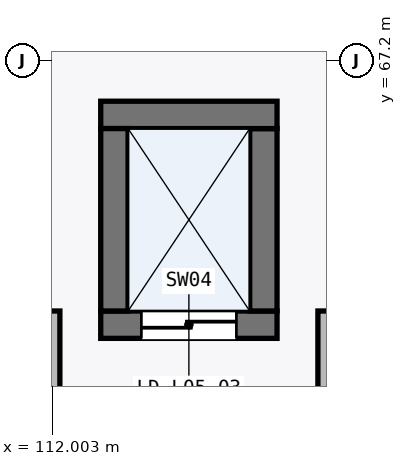
"""IFC4 building model, lengths in metres.
Left out: names, types, materials, properties, quantities, classifications, styles, units other than length and angle.
Written with IfcOpenShell. Run it as: python <this file> out.ifc"""

import sys

from ifc_helpers import new_model, si_unit, direction, frame, frame_2d, origin, place, context, subcontext, project, spatial, rectangle, extrude, element, fill, save


model = new_model("IFC4")
c1 = context("Model", 3, precision=1e-05, world=origin(), true_north=direction((0.0, 1.0)))
c2 = subcontext(c1, "Body", "Model", "MODEL_VIEW")
j1 = project(units=[si_unit("LENGTHUNIT", "METRE"), si_unit("PLANEANGLEUNIT", "RADIAN")], contexts=[c1])
p1 = place(None, origin())
s1 = spatial("IfcSite", under=j1, at=p1, CompositionType="ELEMENT")
p2 = place(p1, origin())
s2 = spatial("IfcBuilding", under=s1, at=p2, CompositionType="ELEMENT")
p3 = place(p2, frame((0.0, 0.0, 21.6)))
s3 = spatial("IfcBuildingStorey", under=s2, at=p3, CompositionType="ELEMENT", Elevation=21.6)
p4 = place(p3, frame((112.64, 63.72, 0.0), z_axis=(0.0, 0.0, 1.0), x_axis=(1.0, 0.0, 0.0)))
e1 = element("IfcWall", 1, at=p4, inside=s3, PredefinedType="SHEAR", context=c2, shape_type="SweptSolid", body=[
    extrude(rectangle(XDim=2.32, YDim=0.36, at=frame_2d((1.16, 0.0))), origin(), (0.0, 0.0, 1.0), 4.845),
])
p5 = place(p4, frame((0.535, 0.0, 0.0)))
e2 = element("IfcOpeningElement", 2, at=p5, cuts=e1, PredefinedType="OPENING", context=c2, shape_type="SweptSolid", body=[
    extrude(rectangle(XDim=1.25, YDim=2.2, at=frame_2d((0.625, 1.1))), frame((0.0, 0.19, 0.0), z_axis=(0.0, -1.0, 0.0), x_axis=(1.0, 0.0, 0.0)), (0.0, 0.0, 1.0), 0.38),
])
p6 = place(p3, frame((114.78, 63.9, 0.0), z_axis=(0.0, 0.0, 1.0), x_axis=(0.0, 1.0, 0.0)))
e3 = element("IfcWall", 3, at=p6, inside=s3, PredefinedType="SHEAR", context=c2, shape_type="SweptSolid", body=[
    extrude(rectangle(XDim=2.4, YDim=0.36, at=frame_2d((1.2, 0.0))), origin(), (0.0, 0.0, 1.0), 4.845),
])
p7 = place(p3, frame((114.96, 66.48, 0.0), z_axis=(0.0, 0.0, 1.0), x_axis=(-1.0, 0.0, 0.0)))
e4 = element("IfcWall", 4, at=p7, inside=s3, PredefinedType="SHEAR", context=c2, shape_type="SweptSolid", body=[
    extrude(rectangle(XDim=2.32, YDim=0.36, at=frame_2d((1.16, 0.0))), origin(), (0.0, 0.0, 1.0), 4.845),
])
p8 = place(p3, frame((112.82, 66.3, 0.0), z_axis=(0.0, 0.0, 1.0), x_axis=(0.0, -1.0, 0.0)))
e5 = element("IfcWall", 5, at=p8, inside=s3, PredefinedType="SHEAR", context=c2, shape_type="SweptSolid", body=[
    extrude(rectangle(XDim=2.4, YDim=0.36, at=frame_2d((1.2, 0.0))), origin(), (0.0, 0.0, 1.0), 4.845),
])
for number, where, z_axis, x_axis in (
    (6, (115.6, 59.397, 0.0), (0.0, 0.0, 1.0), (0.0, 1.0, 0.0)),
    (7, (112.0, 63.9, 0.0), (0.0, 0.0, 1.0), (0.0, -1.0, 0.0)),
):
    element("IfcWall", number, at=place(p3, frame(where, z_axis=z_axis, x_axis=x_axis)), inside=s3, PredefinedType="PARTITIONING", context=c2, shape_type="SweptSolid", body=[
        extrude(rectangle(XDim=4.502, YDim=0.205, at=frame_2d((2.251, 0.0))), origin(), (0.0, 0.0, 1.0), 4.845),
    ])
p9 = place(p5, frame((1.25, 0.0, 0.0), z_axis=(0.0, 0.0, 1.0), x_axis=(-1.0, 0.0, 0.0)))
e8 = element("IfcDoor", 8, at=p9, inside=s3, OperationType="DOUBLE_DOOR_SLIDING", PredefinedType="DOOR", context=c2, shape_type="SweptSolid", body=[
    extrude(rectangle(XDim=1.25, YDim=2.2, at=frame_2d((0.625, 1.1))), frame((0.0, 0.025, 0.0), z_axis=(0.0, -1.0, 0.0), x_axis=(1.0, 0.0, 0.0)), (0.0, 0.0, 1.0), 0.05),
])
fill(e2, e8)
save(model, sys.argv[1])
